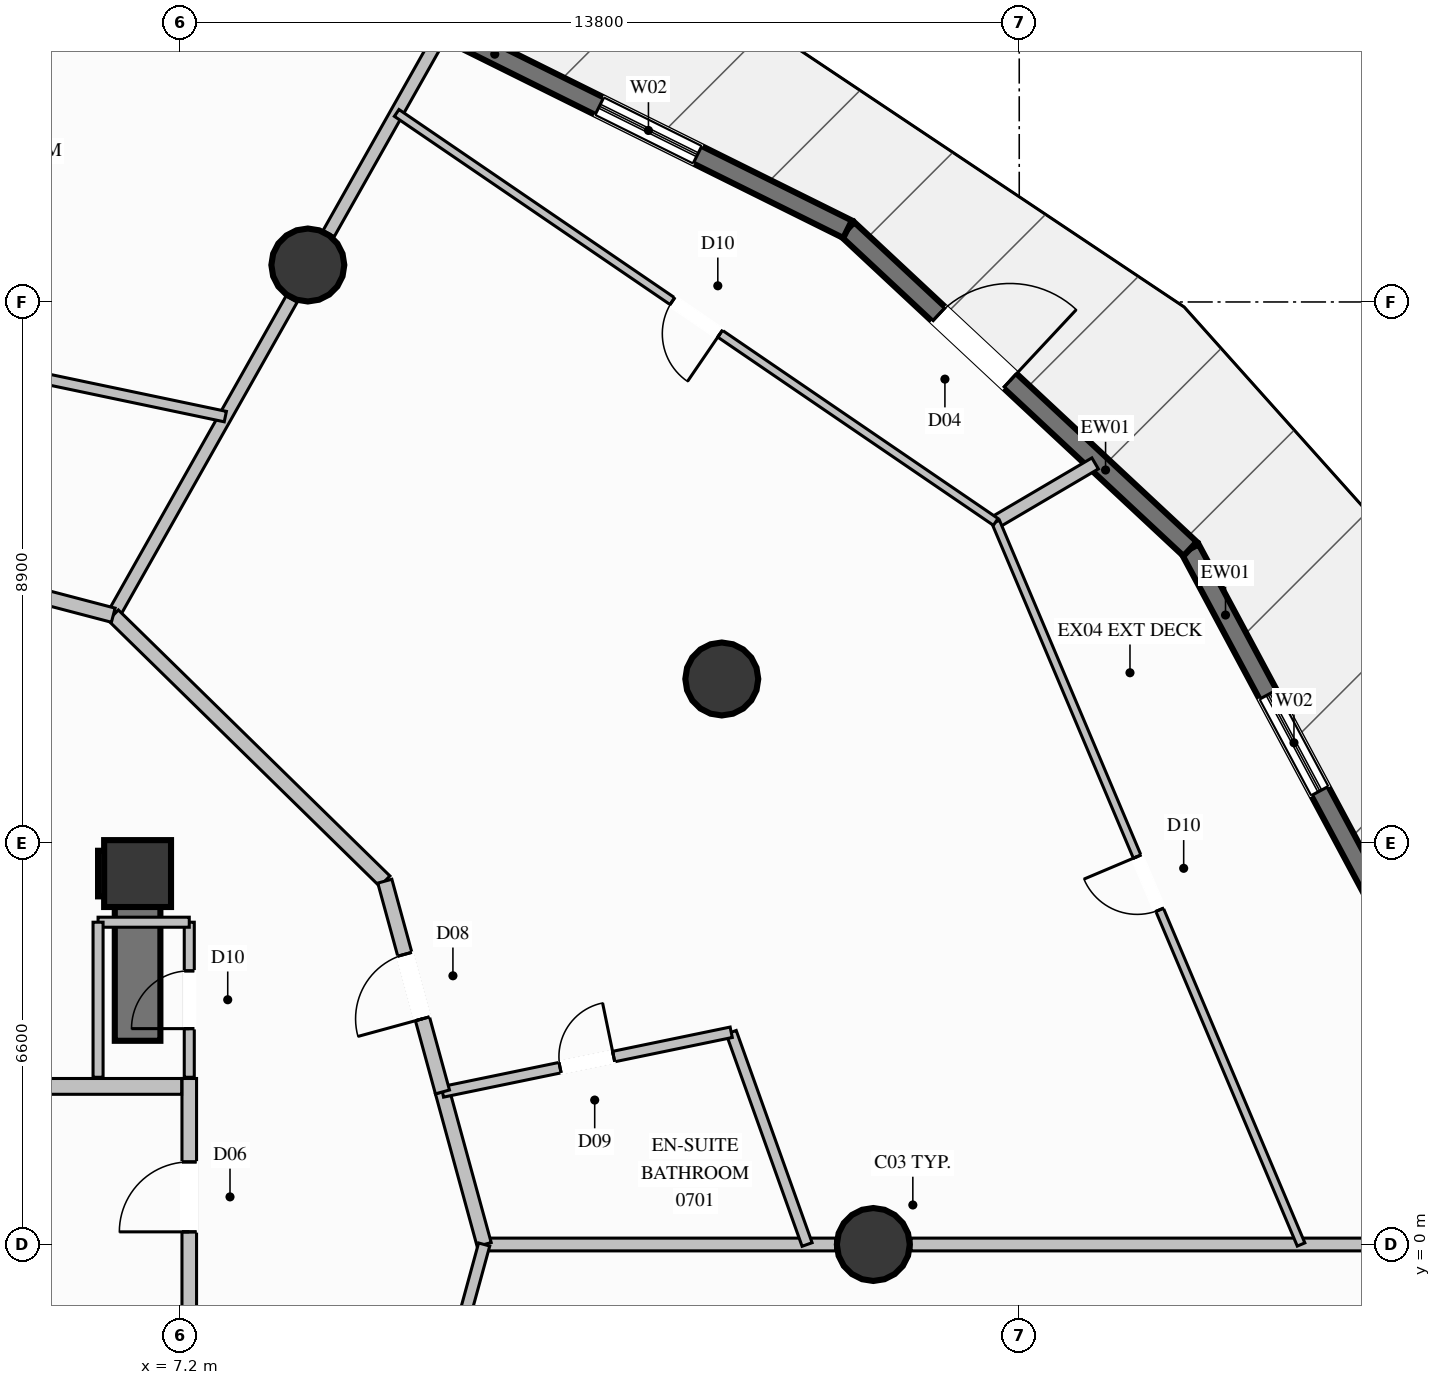
"""IFC4 building model, lengths in metres.
Left out: names, types, materials, properties, quantities, classifications, styles, units other than length and angle.
Written with IfcOpenShell. Run it as: python <this file> out.ifc"""

import sys

from ifc_helpers import new_model, si_unit, direction, frame, frame_2d, origin, origin_2d, place, context, subcontext, project, spatial, rectangle, circle, extrude, element, fill, save


model = new_model("IFC4")
c1 = context("Model", 3, precision=1e-05, world=origin(), true_north=direction((0.0, 1.0)))
c2 = subcontext(c1, "Body", "Model", "MODEL_VIEW")
j1 = project(units=[si_unit("LENGTHUNIT", "METRE"), si_unit("PLANEANGLEUNIT", "RADIAN")], contexts=[c1])
p1 = place(None, origin())
s1 = spatial("IfcSite", under=j1, at=p1, CompositionType="ELEMENT")
p2 = place(p1, origin())
s2 = spatial("IfcBuilding", under=s1, at=p2, CompositionType="ELEMENT")
p3 = place(p2, frame((0.0, 0.0, 28.4)))
s3 = spatial("IfcBuildingStorey", under=s2, at=p3, CompositionType="ELEMENT", Elevation=28.4)
p4 = place(p3, frame((6.5, 6.1, 0.0), z_axis=(0.0, 0.0, 1.0), x_axis=(1.0, 0.0, 0.0)))
e1 = element("IfcColumn", 1, at=p4, inside=s3, PredefinedType="COLUMN", context=c2, shape_type="SweptSolid", body=[
    extrude(rectangle(XDim=1.1, YDim=1.1, at=origin_2d()), origin(), (0.0, 0.0, 1.0), 3.6),
])
p5 = place(p3, frame((5.85, 6.1, 0.0), z_axis=(0.0, 0.0, 1.0), x_axis=(1.0, 0.0, 0.0)))
e2 = element("IfcWall", 2, at=p5, inside=s3, PredefinedType="SHEAR", context=c2, shape_type="SweptSolid", body=[
    extrude(rectangle(XDim=0.275, YDim=0.75, at=frame_2d((0.137, 0.0))), origin(), (0.0, 0.0, 1.0), 3.6),
])
p6 = place(p3, frame((6.5, 3.35, 0.0), z_axis=(0.0, 0.0, 1.0), x_axis=(0.0, 1.0, 0.0)))
e3 = element("IfcWall", 3, at=p6, inside=s3, PredefinedType="SHEAR", context=c2, shape_type="SweptSolid", body=[
    extrude(rectangle(XDim=3.125, YDim=0.75, at=frame_2d((1.562, 0.0))), origin(), (0.0, 0.0, 1.0), 3.6),
])
for number, where, z_axis, x_axis in (
    (4, (18.6, 0.0, 0.0), (0.0, 0.0, 1.0), (1.0, 0.0, 0.0)),
    (5, (16.108, 9.3, 0.0), (0.0, 0.0, 1.0), (1.0, 0.0, 0.0)),
    (6, (9.3, 16.108, 0.0), (0.0, 0.0, 1.0), (1.0, 0.0, 0.0)),
):
    element("IfcColumn", number, at=place(p3, frame(where, z_axis=z_axis, x_axis=x_axis)), inside=s3, PredefinedType="COLUMN", context=c2, shape_type="SweptSolid", body=[
        extrude(circle(Radius=0.6, at=origin_2d()), origin(), (0.0, 0.0, 1.0), 3.6),
    ])
p7 = place(p3, frame((23.81, 11.439, 0.0), z_axis=(0.0, 0.0, 1.0), x_axis=(0.472255130515, -0.881461905985, 0.0)))
e7 = element("IfcWall", 7, at=p7, inside=s3, PredefinedType="SOLIDWALL", context=c2, shape_type="SweptSolid", body=[
    extrude(rectangle(XDim=7.233, YDim=0.32, at=frame_2d((3.617, 0.0))), origin(), (0.0, 0.0, 1.0), 3.34),
])
p8 = place(p7, frame((2.717, 0.0, 0.35)))
e8 = element("IfcOpeningElement", 8, at=p8, cuts=e7, PredefinedType="OPENING", context=c2, shape_type="SweptSolid", body=[
    extrude(rectangle(XDim=1.8, YDim=2.6, at=frame_2d((0.9, 1.3))), frame((0.0, 0.17, 0.0), z_axis=(0.0, -1.0, 0.0), x_axis=(1.0, 0.0, 0.0)), (0.0, 0.0, 1.0), 0.34),
])
p9 = place(p3, frame((18.177, 16.696, 0.0), z_axis=(0.0, 0.0, 1.0), x_axis=(0.731083716984, -0.682287768292, 0.0)))
e9 = element("IfcWall", 9, at=p9, inside=s3, PredefinedType="SOLIDWALL", context=c2, shape_type="SweptSolid", body=[
    extrude(rectangle(XDim=7.705, YDim=0.32, at=frame_2d((3.853, 0.0))), origin(), (0.0, 0.0, 1.0), 3.34),
])
p10 = place(p9, frame((2.052, 0.0, 0.0)))
e10 = element("IfcOpeningElement", 10, at=p10, cuts=e9, PredefinedType="OPENING", context=c2, shape_type="SweptSolid", body=[
    extrude(rectangle(XDim=1.6, YDim=2.3, at=frame_2d((0.8, 1.15))), frame((0.0, 0.17, 0.0), z_axis=(0.0, -1.0, 0.0), x_axis=(1.0, 0.0, 0.0)), (0.0, 0.0, 1.0), 0.34),
])
p11 = place(p3, frame((10.876, 20.318, 0.0), z_axis=(0.0, 0.0, 1.0), x_axis=(0.895818759339, -0.444419565743, 0.0)))
e11 = element("IfcWall", 11, at=p11, inside=s3, PredefinedType="SOLIDWALL", context=c2, shape_type="SweptSolid", body=[
    extrude(rectangle(XDim=8.15, YDim=0.32, at=frame_2d((4.075, 0.0))), origin(), (0.0, 0.0, 1.0), 3.34),
])
p12 = place(p11, frame((3.594, 0.0, 0.35)))
e12 = element("IfcOpeningElement", 12, at=p12, cuts=e11, PredefinedType="OPENING", context=c2, shape_type="SweptSolid", body=[
    extrude(rectangle(XDim=1.8, YDim=2.6, at=frame_2d((0.9, 1.3))), frame((0.0, 0.17, 0.0), z_axis=(0.0, -1.0, 0.0), x_axis=(1.0, 0.0, 0.0)), (0.0, 0.0, 1.0), 0.34),
])
p13 = place(p3, frame((7.35, -2.34, 0.0), z_axis=(0.0, 0.0, 1.0), x_axis=(0.0, 1.0, 0.0)))
e13 = element("IfcWall", 13, at=p13, inside=s3, PredefinedType="PARTITIONING", context=c2, shape_type="SweptSolid", body=[
    extrude(rectangle(XDim=5.07, YDim=0.24, at=frame_2d((2.535, 0.0))), origin(), (0.0, 0.0, 1.0), 2.425),
])
p14 = place(p13, frame((2.548, 0.0, 0.0)))
e14 = element("IfcOpeningElement", 14, at=p14, cuts=e13, PredefinedType="OPENING", context=c2, shape_type="SweptSolid", body=[
    extrude(rectangle(XDim=1.15, YDim=2.2, at=frame_2d((0.575, 1.1))), frame((0.0, 0.13, 0.0), z_axis=(0.0, -1.0, 0.0), x_axis=(1.0, 0.0, 0.0)), (0.0, 0.0, 1.0), 0.26),
])
p15 = place(p3, frame((4.13, 2.6, 0.0), z_axis=(0.0, 0.0, 1.0), x_axis=(1.0, 0.0, 0.0)))
e15 = element("IfcWall", 15, at=p15, inside=s3, PredefinedType="PARTITIONING", context=c2, shape_type="SweptSolid", body=[
    extrude(rectangle(XDim=3.095, YDim=0.26, at=frame_2d((1.548, 0.0))), origin(), (0.0, 0.0, 1.0), 3.34),
])
p16 = place(p3, frame((7.35, 2.75, 0.0), z_axis=(0.0, 0.0, 1.0), x_axis=(0.0, 1.0, 0.0)))
e16 = element("IfcWall", 16, at=p16, inside=s3, PredefinedType="PARTITIONING", context=c2, shape_type="SweptSolid", body=[
    extrude(rectangle(XDim=2.55, YDim=0.165, at=frame_2d((1.275, 0.0))), origin(), (0.0, 0.0, 1.0), 3.34),
])
p17 = place(p16, frame((0.8, 0.0, 0.0)))
e17 = element("IfcOpeningElement", 17, at=p17, cuts=e16, PredefinedType="OPENING", context=c2, shape_type="SweptSolid", body=[
    extrude(rectangle(XDim=0.95, YDim=2.1, at=frame_2d((0.475, 1.05))), frame((0.0, 0.093, 0.0), z_axis=(0.0, -1.0, 0.0), x_axis=(1.0, 0.0, 0.0)), (0.0, 0.0, 1.0), 0.185),
])
p18 = place(p3, frame((7.35, 5.3, 0.0), z_axis=(0.0, 0.0, 1.0), x_axis=(-1.0, 0.0, 0.0)))
e18 = element("IfcWall", 18, at=p18, inside=s3, PredefinedType="PARTITIONING", context=c2, shape_type="SweptSolid", body=[
    extrude(rectangle(XDim=1.5, YDim=0.165, at=frame_2d((0.75, 0.0))), origin(), (0.0, 0.0, 1.0), 2.425),
])
p19 = place(p3, frame((5.85, 5.3, 0.0), z_axis=(0.0, 0.0, 1.0), x_axis=(0.0, -1.0, 0.0)))
e19 = element("IfcWall", 19, at=p19, inside=s3, PredefinedType="PARTITIONING", context=c2, shape_type="SweptSolid", body=[
    extrude(rectangle(XDim=2.55, YDim=0.165, at=frame_2d((1.275, 0.0))), origin(), (0.0, 0.0, 1.0), 2.425),
])
p20 = place(p3, frame((12.2, 0.0, 0.0), z_axis=(0.0, 0.0, 1.0), x_axis=(1.0, 0.0, 0.0)))
e20 = element("IfcWall", 20, at=p20, inside=s3, PredefinedType="PARTITIONING", context=c2, shape_type="SweptSolid", body=[
    extrude(rectangle(XDim=5.78, YDim=0.21, at=frame_2d((2.89, 0.0))), origin(), (0.0, 0.0, 1.0), 2.708),
])
p21 = place(p3, frame((19.22, 0.0, 0.0), z_axis=(0.0, 0.0, 1.0), x_axis=(1.0, 0.0, 0.0)))
e21 = element("IfcWall", 21, at=p21, inside=s3, PredefinedType="PARTITIONING", context=c2, shape_type="SweptSolid", body=[
    extrude(rectangle(XDim=8.602, YDim=0.21, at=frame_2d((4.301, 0.0))), origin(), (0.0, 0.0, 1.0), 3.34),
])
p22 = place(p3, frame((6.1, 10.349, 0.0), z_axis=(0.0, 0.0, 1.0), x_axis=(0.491458802648, 0.870900824032, 0.0)))
e22 = element("IfcWall", 22, at=p22, inside=s3, PredefinedType="PARTITIONING", context=c2, shape_type="SweptSolid", body=[
    extrude(rectangle(XDim=5.97, YDim=0.21, at=frame_2d((2.985, 0.0))), origin(), (0.0, 0.0, 1.0), 2.708),
])
p23 = place(p3, frame((9.642, 16.625, 0.0), z_axis=(0.0, 0.0, 1.0), x_axis=(0.491316217202, 0.870981271161, 0.0)))
e23 = element("IfcWall", 23, at=p23, inside=s3, PredefinedType="PARTITIONING", context=c2, shape_type="SweptSolid", body=[
    extrude(rectangle(XDim=3.822, YDim=0.21, at=frame_2d((1.911, 0.0))), origin(), (0.0, 0.0, 1.0), 3.34),
])
p24 = place(p3, frame((12.2, 0.0, 0.0), z_axis=(0.0, 0.0, 1.0), x_axis=(-0.263744763784, 0.964592504416, 0.0)))
e24 = element("IfcWall", 24, at=p24, inside=s3, PredefinedType="PARTITIONING", context=c2, shape_type="SweptSolid", body=[
    extrude(rectangle(XDim=2.601, YDim=0.24, at=frame_2d((1.301, 0.0))), origin(), (0.0, 0.0, 1.0), 2.919),
])
p25 = place(p3, frame((17.511, 0.0, 0.0), z_axis=(0.0, 0.0, 1.0), x_axis=(-0.336724431673, 0.94160323763, 0.0)))
e25 = element("IfcWall", 25, at=p25, inside=s3, PredefinedType="PLUMBINGWALL", context=c2, shape_type="SweptSolid", body=[
    extrude(rectangle(XDim=3.707, YDim=0.175, at=frame_2d((1.853, 0.0))), origin(), (0.0, 0.0, 1.0), 3.34),
])
p26 = place(p3, frame((11.514, 2.509, 0.0), z_axis=(0.0, 0.0, 1.0), x_axis=(0.979325812174, 0.202289281992, 0.0)))
e26 = element("IfcWall", 26, at=p26, inside=s3, PredefinedType="PLUMBINGWALL", context=c2, shape_type="SweptSolid", body=[
    extrude(rectangle(XDim=4.849, YDim=0.175, at=frame_2d((2.425, 0.0))), origin(), (0.0, 0.0, 1.0), 3.34),
])
p27 = place(p26, frame((1.975, 0.0, 0.0)))
e27 = element("IfcOpeningElement", 27, at=p27, cuts=e26, PredefinedType="OPENING", context=c2, shape_type="SweptSolid", body=[
    extrude(rectangle(XDim=0.9, YDim=2.1, at=frame_2d((0.45, 1.05))), frame((0.0, 0.098, 0.0), z_axis=(0.0, -1.0, 0.0), x_axis=(1.0, 0.0, 0.0)), (0.0, 0.0, 1.0), 0.195),
])
p28 = place(p3, frame((20.613, 11.883, 0.0), z_axis=(0.0, 0.0, 1.0), x_axis=(0.861901128596, 0.507076369519, 0.0)))
e28 = element("IfcWall", 28, at=p28, inside=s3, PredefinedType="PARTITIONING", context=c2, shape_type="SweptSolid", body=[
    extrude(rectangle(XDim=1.897, YDim=0.21, at=frame_2d((0.948, 0.0))), origin(), (0.0, 0.0, 1.0), 3.34),
])
p29 = place(p3, frame((10.566, 5.975, 0.0), z_axis=(0.0, 0.0, 1.0), x_axis=(-0.714411174131, 0.699726142342, 0.0)))
e29 = element("IfcWall", 29, at=p29, inside=s3, PredefinedType="PARTITIONING", context=c2, shape_type="SweptSolid", body=[
    extrude(rectangle(XDim=6.251, YDim=0.24, at=frame_2d((3.125, 0.0))), origin(), (0.0, 0.0, 1.0), 3.34),
])
p30 = place(p3, frame((11.514, 2.509, 0.0), z_axis=(0.0, 0.0, 1.0), x_axis=(-0.263818706543, 0.96457228349, 0.0)))
e30 = element("IfcWall", 30, at=p30, inside=s3, PredefinedType="PARTITIONING", context=c2, shape_type="SweptSolid", body=[
    extrude(rectangle(XDim=3.593, YDim=0.24, at=frame_2d((1.797, 0.0))), origin(), (0.0, 0.0, 1.0), 2.919),
])
p31 = place(p30, frame((1.247, 0.0, 0.0)))
e31 = element("IfcOpeningElement", 31, at=p31, cuts=e30, PredefinedType="OPENING", context=c2, shape_type="SweptSolid", body=[
    extrude(rectangle(XDim=1.1, YDim=2.3, at=frame_2d((0.55, 1.15))), frame((0.0, 0.13, 0.0), z_axis=(0.0, -1.0, 0.0), x_axis=(1.0, 0.0, 0.0)), (0.0, 0.0, 1.0), 0.26),
])
p32 = place(p3, frame((25.635, 0.0, 0.0), z_axis=(0.0, 0.0, 1.0), x_axis=(-0.389280036571, 0.921119456491, 0.0)))
e32 = element("IfcWall", 32, at=p32, inside=s3, PredefinedType="PARTITIONING", context=c2, shape_type="SweptSolid", body=[
    extrude(rectangle(XDim=12.901, YDim=0.135, at=frame_2d((6.45, 0.0))), origin(), (0.0, 0.0, 1.0), 3.34),
])
p33 = place(p32, frame((5.975, 0.0, 0.0)))
e33 = element("IfcOpeningElement", 33, at=p33, cuts=e32, PredefinedType="OPENING", context=c2, shape_type="SweptSolid", body=[
    extrude(rectangle(XDim=0.95, YDim=2.1, at=frame_2d((0.475, 1.05))), frame((0.0, 0.078, 0.0), z_axis=(0.0, -1.0, 0.0), x_axis=(1.0, 0.0, 0.0)), (0.0, 0.0, 1.0), 0.155),
])
p34 = place(p3, frame((20.613, 11.883, 0.0), z_axis=(0.0, 0.0, 1.0), x_axis=(-0.825894658533, 0.563824452295, 0.0)))
e34 = element("IfcWall", 34, at=p34, inside=s3, PredefinedType="PARTITIONING", context=c2, shape_type="SweptSolid", body=[
    extrude(rectangle(XDim=11.929, YDim=0.135, at=frame_2d((5.964, 0.0))), origin(), (0.0, 0.0, 1.0), 3.34),
])
p35 = place(p34, frame((5.489, 0.0, 0.0)))
e35 = element("IfcOpeningElement", 35, at=p35, cuts=e34, PredefinedType="OPENING", context=c2, shape_type="SweptSolid", body=[
    extrude(rectangle(XDim=0.95, YDim=2.1, at=frame_2d((0.475, 1.05))), frame((0.0, 0.078, 0.0), z_axis=(0.0, -1.0, 0.0), x_axis=(1.0, 0.0, 0.0)), (0.0, 0.0, 1.0), 0.155),
])
p36 = place(p3, frame((6.1, 10.349, 0.0), z_axis=(0.0, 0.0, 1.0), x_axis=(-0.967291490053, 0.253667446219, 0.0)))
e36 = element("IfcWall", 36, at=p36, inside=s3, PredefinedType="PARTITIONING", context=c2, shape_type="SweptSolid", body=[
    extrude(rectangle(XDim=2.649, YDim=0.24, at=frame_2d((1.324, 0.0))), origin(), (0.0, 0.0, 1.0), 3.34),
])
p37 = place(p3, frame((7.943, 13.615, 0.0), z_axis=(0.0, 0.0, 1.0), x_axis=(-0.978691652986, 0.205335453283, 0.0)))
e37 = element("IfcWall", 37, at=p37, inside=s3, PredefinedType="PLUMBINGWALL", context=c2, shape_type="SweptSolid", body=[
    extrude(rectangle(XDim=3.409, YDim=0.175, at=frame_2d((1.705, 0.0))), origin(), (0.0, 0.0, 1.0), 3.34),
])
p38 = place(p3, frame((10.566, -5.975, 0.0), z_axis=(0.0, 0.0, 1.0), x_axis=(0.263787657435, 0.964580775148, 0.0)))
e38 = element("IfcWall", 38, at=p38, inside=s3, PredefinedType="PARTITIONING", context=c2, shape_type="SweptSolid", body=[
    extrude(rectangle(XDim=6.195, YDim=0.19, at=frame_2d((3.097, 0.0))), origin(), (0.0, 0.0, 1.0), 2.919),
])
p39 = place(p38, frame((2.622, 0.0, 0.0)))
e39 = element("IfcOpeningElement", 39, at=p39, cuts=e38, PredefinedType="OPENING", context=c2, shape_type="SweptSolid", body=[
    extrude(rectangle(XDim=0.95, YDim=2.1, at=frame_2d((0.475, 1.05))), frame((0.0, 0.105, 0.0), z_axis=(0.0, -1.0, 0.0), x_axis=(1.0, 0.0, 0.0)), (0.0, 0.0, 1.0), 0.21),
])
p40 = place(p8, origin())
e40 = element("IfcWindow", 40, at=p40, inside=s3, PartitioningType="SINGLE_PANEL", PredefinedType="WINDOW", context=c2, shape_type="SweptSolid", body=[
    extrude(rectangle(XDim=1.8, YDim=2.6, at=frame_2d((0.9, 1.3))), frame((0.0, 0.03, 0.0), z_axis=(0.0, -1.0, 0.0), x_axis=(1.0, 0.0, 0.0)), (0.0, 0.0, 1.0), 0.06),
])
fill(e8, e40)
p41 = place(p10, origin())
e41 = element("IfcDoor", 41, at=p41, inside=s3, OperationType="SINGLE_SWING_RIGHT", PredefinedType="DOOR", context=c2, shape_type="SweptSolid", body=[
    extrude(rectangle(XDim=1.6, YDim=2.3, at=frame_2d((0.8, 1.15))), frame((0.0, 0.025, 0.0), z_axis=(0.0, -1.0, 0.0), x_axis=(1.0, 0.0, 0.0)), (0.0, 0.0, 1.0), 0.05),
])
fill(e10, e41)
p42 = place(p12, origin())
e42 = element("IfcWindow", 42, at=p42, inside=s3, PartitioningType="SINGLE_PANEL", PredefinedType="WINDOW", context=c2, shape_type="SweptSolid", body=[
    extrude(rectangle(XDim=1.8, YDim=2.6, at=frame_2d((0.9, 1.3))), frame((0.0, 0.03, 0.0), z_axis=(0.0, -1.0, 0.0), x_axis=(1.0, 0.0, 0.0)), (0.0, 0.0, 1.0), 0.06),
])
fill(e12, e42)
p43 = place(p14, origin())
e43 = element("IfcDoor", 43, at=p43, inside=s3, OperationType="SINGLE_SWING_LEFT", PredefinedType="DOOR", context=c2, shape_type="SweptSolid", body=[
    extrude(rectangle(XDim=1.15, YDim=2.2, at=frame_2d((0.575, 1.1))), frame((0.0, 0.025, 0.0), z_axis=(0.0, -1.0, 0.0), x_axis=(1.0, 0.0, 0.0)), (0.0, 0.0, 1.0), 0.05),
])
fill(e14, e43)
p44 = place(p17, origin())
e44 = element("IfcDoor", 44, at=p44, inside=s3, OperationType="SINGLE_SWING_LEFT", PredefinedType="DOOR", context=c2, shape_type="SweptSolid", body=[
    extrude(rectangle(XDim=0.95, YDim=2.1, at=frame_2d((0.475, 1.05))), frame((0.0, 0.025, 0.0), z_axis=(0.0, -1.0, 0.0), x_axis=(1.0, 0.0, 0.0)), (0.0, 0.0, 1.0), 0.05),
])
fill(e17, e44)
p45 = place(p27, origin())
e45 = element("IfcDoor", 45, at=p45, inside=s3, OperationType="SINGLE_SWING_RIGHT", PredefinedType="DOOR", context=c2, shape_type="SweptSolid", body=[
    extrude(rectangle(XDim=0.9, YDim=2.1, at=frame_2d((0.45, 1.05))), frame((0.0, 0.025, 0.0), z_axis=(0.0, -1.0, 0.0), x_axis=(1.0, 0.0, 0.0)), (0.0, 0.0, 1.0), 0.05),
])
fill(e27, e45)
p46 = place(p31, origin())
e46 = element("IfcDoor", 46, at=p46, inside=s3, OperationType="SINGLE_SWING_LEFT", PredefinedType="DOOR", context=c2, shape_type="SweptSolid", body=[
    extrude(rectangle(XDim=1.1, YDim=2.3, at=frame_2d((0.55, 1.15))), frame((0.0, 0.025, 0.0), z_axis=(0.0, -1.0, 0.0), x_axis=(1.0, 0.0, 0.0)), (0.0, 0.0, 1.0), 0.05),
])
fill(e31, e46)
p47 = place(p33, origin())
e47 = element("IfcDoor", 47, at=p47, inside=s3, OperationType="SINGLE_SWING_RIGHT", PredefinedType="DOOR", context=c2, shape_type="SweptSolid", body=[
    extrude(rectangle(XDim=0.95, YDim=2.1, at=frame_2d((0.475, 1.05))), frame((0.0, 0.025, 0.0), z_axis=(0.0, -1.0, 0.0), x_axis=(1.0, 0.0, 0.0)), (0.0, 0.0, 1.0), 0.05),
])
fill(e33, e47)
p48 = place(p35, origin())
e48 = element("IfcDoor", 48, at=p48, inside=s3, OperationType="SINGLE_SWING_LEFT", PredefinedType="DOOR", context=c2, shape_type="SweptSolid", body=[
    extrude(rectangle(XDim=0.95, YDim=2.1, at=frame_2d((0.475, 1.05))), frame((0.0, 0.025, 0.0), z_axis=(0.0, -1.0, 0.0), x_axis=(1.0, 0.0, 0.0)), (0.0, 0.0, 1.0), 0.05),
])
fill(e35, e48)
save(model, sys.argv[1])
